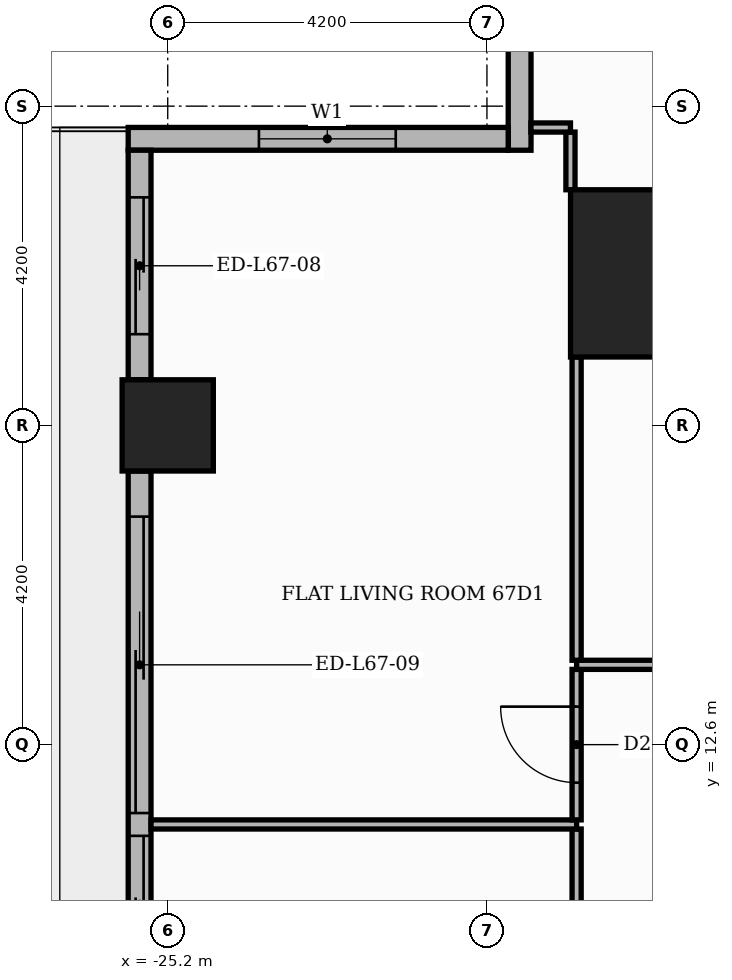
"""IFC4 building model, lengths in metres.
Left out: names, types, materials, properties, quantities, classifications, styles, units other than length and angle.
Written with IfcOpenShell. Run it as: python <this file> out.ifc"""

import sys

from ifc_helpers import new_model, si_unit, direction, frame, frame_2d, origin, origin_2d, place, context, subcontext, project, spatial, rectangle, extrude, element, fill, save


model = new_model("IFC4")
c1 = context("Model", 3, precision=1e-05, world=origin(), true_north=direction((0.0, 1.0)))
c2 = subcontext(c1, "Body", "Model", "MODEL_VIEW")
j1 = project(units=[si_unit("LENGTHUNIT", "METRE"), si_unit("PLANEANGLEUNIT", "RADIAN")], contexts=[c1])
p1 = place(None, origin())
s1 = spatial("IfcSite", under=j1, at=p1, CompositionType="ELEMENT")
p2 = place(p1, origin())
s2 = spatial("IfcBuilding", under=s1, at=p2, CompositionType="ELEMENT")
p3 = place(p2, frame((0.0, 0.0, 279.6)))
s3 = spatial("IfcBuildingStorey", under=s2, at=p3, CompositionType="ELEMENT", Elevation=279.6)
p4 = place(p3, frame((-18.8, 18.8, 0.0), z_axis=(0.0, 0.0, 1.0), x_axis=(1.0, 0.0, 0.0)))
e1 = element("IfcColumn", 1, at=p4, inside=s3, PredefinedType="COLUMN", context=c2, shape_type="SweptSolid", body=[
    extrude(rectangle(XDim=2.2, YDim=2.2, at=origin_2d()), origin(), (0.0, 0.0, 1.0), 3.9),
])
p5 = place(p3, frame((-25.2, 16.8, 0.0), z_axis=(0.0, 0.0, 1.0), x_axis=(1.0, 0.0, 0.0)))
e2 = element("IfcColumn", 2, at=p5, inside=s3, PredefinedType="COLUMN", context=c2, shape_type="SweptSolid", body=[
    extrude(rectangle(XDim=1.2, YDim=1.2, at=origin_2d()), origin(), (0.0, 0.0, 1.0), 3.9),
])
p6 = place(p3, frame((-20.57, 25.42, 0.0), z_axis=(0.0, 0.0, 1.0), x_axis=(0.0, -1.0, 0.0)))
e3 = element("IfcWall", 3, at=p6, inside=s3, PredefinedType="STANDARD", context=c2, shape_type="SweptSolid", body=[
    extrude(rectangle(XDim=5.0, YDim=0.3, at=frame_2d((2.5, 0.0))), origin(), (0.0, 0.0, 1.0), 3.48),
])
p7 = place(p6, frame((1.42, 0.0, 0.9)))
e4 = element("IfcOpeningElement", 4, at=p7, cuts=e3, PredefinedType="OPENING", context=c2, shape_type="SweptSolid", body=[
    extrude(rectangle(XDim=1.8, YDim=2.1, at=frame_2d((0.9, 1.05))), frame((0.0, 0.16, 0.0), z_axis=(0.0, -1.0, 0.0), x_axis=(1.0, 0.0, 0.0)), (0.0, 0.0, 1.0), 0.32),
])
p8 = place(p3, frame((-20.72, 20.57, 0.0), z_axis=(0.0, 0.0, 1.0), x_axis=(-1.0, 0.0, 0.0)))
e5 = element("IfcWall", 5, at=p8, inside=s3, PredefinedType="STANDARD", context=c2, shape_type="SweptSolid", body=[
    extrude(rectangle(XDim=5.0, YDim=0.3, at=frame_2d((2.5, 0.0))), origin(), (0.0, 0.0, 1.0), 3.48),
])
p9 = place(p8, frame((1.48, 0.0, 0.9)))
e6 = element("IfcOpeningElement", 6, at=p9, cuts=e5, PredefinedType="OPENING", context=c2, shape_type="SweptSolid", body=[
    extrude(rectangle(XDim=1.8, YDim=2.1, at=frame_2d((0.9, 1.05))), frame((0.0, 0.16, 0.0), z_axis=(0.0, -1.0, 0.0), x_axis=(1.0, 0.0, 0.0)), (0.0, 0.0, 1.0), 0.32),
])
p10 = place(p3, frame((-25.57, 20.42, 0.0), z_axis=(0.0, 0.0, 1.0), x_axis=(0.0, -1.0, 0.0)))
e7 = element("IfcWall", 7, at=p10, inside=s3, PredefinedType="STANDARD", context=c2, shape_type="SweptSolid", body=[
    extrude(rectangle(XDim=3.02, YDim=0.3, at=frame_2d((1.51, 0.0))), origin(), (0.0, 0.0, 1.0), 3.48),
])
p11 = place(p10, frame((0.62, 0.0, 0.0)))
e8 = element("IfcOpeningElement", 8, at=p11, cuts=e7, PredefinedType="OPENING", context=c2, shape_type="SweptSolid", body=[
    extrude(rectangle(XDim=1.8, YDim=2.4, at=frame_2d((0.9, 1.2))), frame((0.0, 0.16, 0.0), z_axis=(0.0, -1.0, 0.0), x_axis=(1.0, 0.0, 0.0)), (0.0, 0.0, 1.0), 0.32),
])
p12 = place(p3, frame((-25.57, 16.2, 0.0), z_axis=(0.0, 0.0, 1.0), x_axis=(0.0, -1.0, 0.0)))
e9 = element("IfcWall", 9, at=p12, inside=s3, PredefinedType="STANDARD", context=c2, shape_type="SweptSolid", body=[
    extrude(rectangle(XDim=7.2, YDim=0.3, at=frame_2d((3.6, 0.0))), origin(), (0.0, 0.0, 1.0), 3.48),
])
p13 = place(p12, frame((0.6, 0.0, 0.0)))
e10 = element("IfcOpeningElement", 10, at=p13, cuts=e9, PredefinedType="OPENING", context=c2, shape_type="SweptSolid", body=[
    extrude(rectangle(XDim=3.9, YDim=2.4, at=frame_2d((1.95, 1.2))), frame((0.0, 0.16, 0.0), z_axis=(0.0, -1.0, 0.0), x_axis=(1.0, 0.0, 0.0)), (0.0, 0.0, 1.0), 0.32),
])
p14 = place(p12, frame((4.8, 0.0, 0.0)))
e11 = element("IfcOpeningElement", 11, at=p14, cuts=e9, PredefinedType="OPENING", context=c2, shape_type="SweptSolid", body=[
    extrude(rectangle(XDim=1.8, YDim=2.4, at=frame_2d((0.9, 1.2))), frame((0.0, 0.16, 0.0), z_axis=(0.0, -1.0, 0.0), x_axis=(1.0, 0.0, 0.0)), (0.0, 0.0, 1.0), 0.32),
])
p15 = place(p3, frame((-19.82, 7.41, 0.0), z_axis=(0.0, 0.0, 1.0), x_axis=(0.0, 1.0, 0.0)))
e12 = element("IfcWall", 12, at=p15, inside=s3, PredefinedType="PARTITIONING", context=c2, shape_type="SweptSolid", body=[
    extrude(rectangle(XDim=4.08, YDim=0.12, at=frame_2d((2.04, 0.0))), origin(), (0.0, 0.0, 1.0), 3.48),
])
p16 = place(p15, frame((1.59, 0.0, 0.0)))
e13 = element("IfcOpeningElement", 13, at=p16, cuts=e12, PredefinedType="OPENING", context=c2, shape_type="SweptSolid", body=[
    extrude(rectangle(XDim=0.9, YDim=2.1, at=frame_2d((0.45, 1.05))), frame((0.0, 0.07, 0.0), z_axis=(0.0, -1.0, 0.0), x_axis=(1.0, 0.0, 0.0)), (0.0, 0.0, 1.0), 0.14),
])
p17 = place(p3, frame((-25.42, 11.55, 0.0), z_axis=(0.0, 0.0, 1.0), x_axis=(1.0, 0.0, 0.0)))
e14 = element("IfcWall", 14, at=p17, inside=s3, PredefinedType="PARTITIONING", context=c2, shape_type="SweptSolid", body=[
    extrude(rectangle(XDim=5.6, YDim=0.12, at=frame_2d((2.8, 0.0))), origin(), (0.0, 0.0, 1.0), 3.48),
])
p18 = place(p3, frame((-19.82, 11.61, 0.0), z_axis=(0.0, 0.0, 1.0), x_axis=(0.0, 1.0, 0.0)))
e15 = element("IfcWall", 15, at=p18, inside=s3, PredefinedType="PARTITIONING", context=c2, shape_type="SweptSolid", body=[
    extrude(rectangle(XDim=1.98, YDim=0.12, at=frame_2d((0.99, 0.0))), origin(), (0.0, 0.0, 1.0), 3.48),
])
p19 = place(p18, frame((0.49, 0.0, 0.0)))
e16 = element("IfcOpeningElement", 16, at=p19, cuts=e15, PredefinedType="OPENING", context=c2, shape_type="SweptSolid", body=[
    extrude(rectangle(XDim=1.0, YDim=2.1, at=frame_2d((0.5, 1.05))), frame((0.0, 0.07, 0.0), z_axis=(0.0, -1.0, 0.0), x_axis=(1.0, 0.0, 0.0)), (0.0, 0.0, 1.0), 0.14),
])
p20 = place(p3, frame((-19.82, 13.65, 0.0), z_axis=(0.0, 0.0, 1.0), x_axis=(1.0, 0.0, 0.0)))
e17 = element("IfcWall", 17, at=p20, inside=s3, PredefinedType="PARTITIONING", context=c2, shape_type="SweptSolid", body=[
    extrude(rectangle(XDim=6.17, YDim=0.12, at=frame_2d((3.085, 0.0))), origin(), (0.0, 0.0, 1.0), 3.48),
])
p21 = place(p20, frame((2.635, 0.0, 0.0)))
e18 = element("IfcOpeningElement", 18, at=p21, cuts=e17, PredefinedType="OPENING", context=c2, shape_type="SweptSolid", body=[
    extrude(rectangle(XDim=0.9, YDim=2.1, at=frame_2d((0.45, 1.05))), frame((0.0, 0.07, 0.0), z_axis=(0.0, -1.0, 0.0), x_axis=(1.0, 0.0, 0.0)), (0.0, 0.0, 1.0), 0.14),
])
p22 = place(p3, frame((-19.82, 13.71, 0.0), z_axis=(0.0, 0.0, 1.0), x_axis=(0.0, 1.0, 0.0)))
e19 = element("IfcWall", 19, at=p22, inside=s3, PredefinedType="PARTITIONING", context=c2, shape_type="SweptSolid", body=[
    extrude(rectangle(XDim=3.99, YDim=0.12, at=frame_2d((1.995, 0.0))), origin(), (0.0, 0.0, 1.0), 3.48),
])
p23 = place(p3, frame((-19.901, 19.9, 0.0), z_axis=(0.0, 0.0, 1.0), x_axis=(0.0, 1.0, 0.0)))
e20 = element("IfcWall", 20, at=p23, inside=s3, PredefinedType="PARTITIONING", context=c2, shape_type="SweptSolid", body=[
    extrude(rectangle(XDim=0.759, YDim=0.12, at=frame_2d((0.379, 0.0))), origin(), (0.0, 0.0, 1.0), 3.48),
])
p24 = place(p3, frame((-20.421, 20.719, 0.0), z_axis=(0.0, 0.0, 1.0), x_axis=(1.0, 0.0, 0.0)))
e21 = element("IfcWall", 21, at=p24, inside=s3, PredefinedType="PARTITIONING", context=c2, shape_type="SweptSolid", body=[
    extrude(rectangle(XDim=0.52, YDim=0.12, at=frame_2d((0.26, 0.0))), origin(), (0.0, 0.0, 1.0), 3.48),
])
p25 = place(p9, origin())
e22 = element("IfcWindow", 22, at=p25, inside=s3, PartitioningType="SINGLE_PANEL", PredefinedType="WINDOW", context=c2, shape_type="SweptSolid", body=[
    extrude(rectangle(XDim=1.8, YDim=2.1, at=frame_2d((0.9, 1.05))), frame((0.0, 0.03, 0.0), z_axis=(0.0, -1.0, 0.0), x_axis=(1.0, 0.0, 0.0)), (0.0, 0.0, 1.0), 0.06),
])
fill(e6, e22)
p26 = place(p11, origin())
e23 = element("IfcDoor", 23, at=p26, inside=s3, OperationType="SLIDING_TO_RIGHT", PredefinedType="DOOR", context=c2, shape_type="SweptSolid", body=[
    extrude(rectangle(XDim=1.8, YDim=2.4, at=frame_2d((0.9, 1.2))), frame((0.0, 0.025, 0.0), z_axis=(0.0, -1.0, 0.0), x_axis=(1.0, 0.0, 0.0)), (0.0, 0.0, 1.0), 0.05),
])
fill(e8, e23)
p27 = place(p13, origin())
e24 = element("IfcDoor", 24, at=p27, inside=s3, OperationType="SLIDING_TO_LEFT", PredefinedType="DOOR", context=c2, shape_type="SweptSolid", body=[
    extrude(rectangle(XDim=3.9, YDim=2.4, at=frame_2d((1.95, 1.2))), frame((0.0, 0.025, 0.0), z_axis=(0.0, -1.0, 0.0), x_axis=(1.0, 0.0, 0.0)), (0.0, 0.0, 1.0), 0.05),
])
fill(e10, e24)
p28 = place(p14, origin())
e25 = element("IfcDoor", 25, at=p28, inside=s3, OperationType="SLIDING_TO_RIGHT", PredefinedType="DOOR", context=c2, shape_type="SweptSolid", body=[
    extrude(rectangle(XDim=1.8, YDim=2.4, at=frame_2d((0.9, 1.2))), frame((0.0, 0.025, 0.0), z_axis=(0.0, -1.0, 0.0), x_axis=(1.0, 0.0, 0.0)), (0.0, 0.0, 1.0), 0.05),
])
fill(e11, e25)
p29 = place(p19, origin())
e26 = element("IfcDoor", 26, at=p29, inside=s3, OperationType="SINGLE_SWING_RIGHT", PredefinedType="DOOR", context=c2, shape_type="SweptSolid", body=[
    extrude(rectangle(XDim=1.0, YDim=2.1, at=frame_2d((0.5, 1.05))), frame((0.0, 0.025, 0.0), z_axis=(0.0, -1.0, 0.0), x_axis=(1.0, 0.0, 0.0)), (0.0, 0.0, 1.0), 0.05),
])
fill(e16, e26)
save(model, sys.argv[1])
